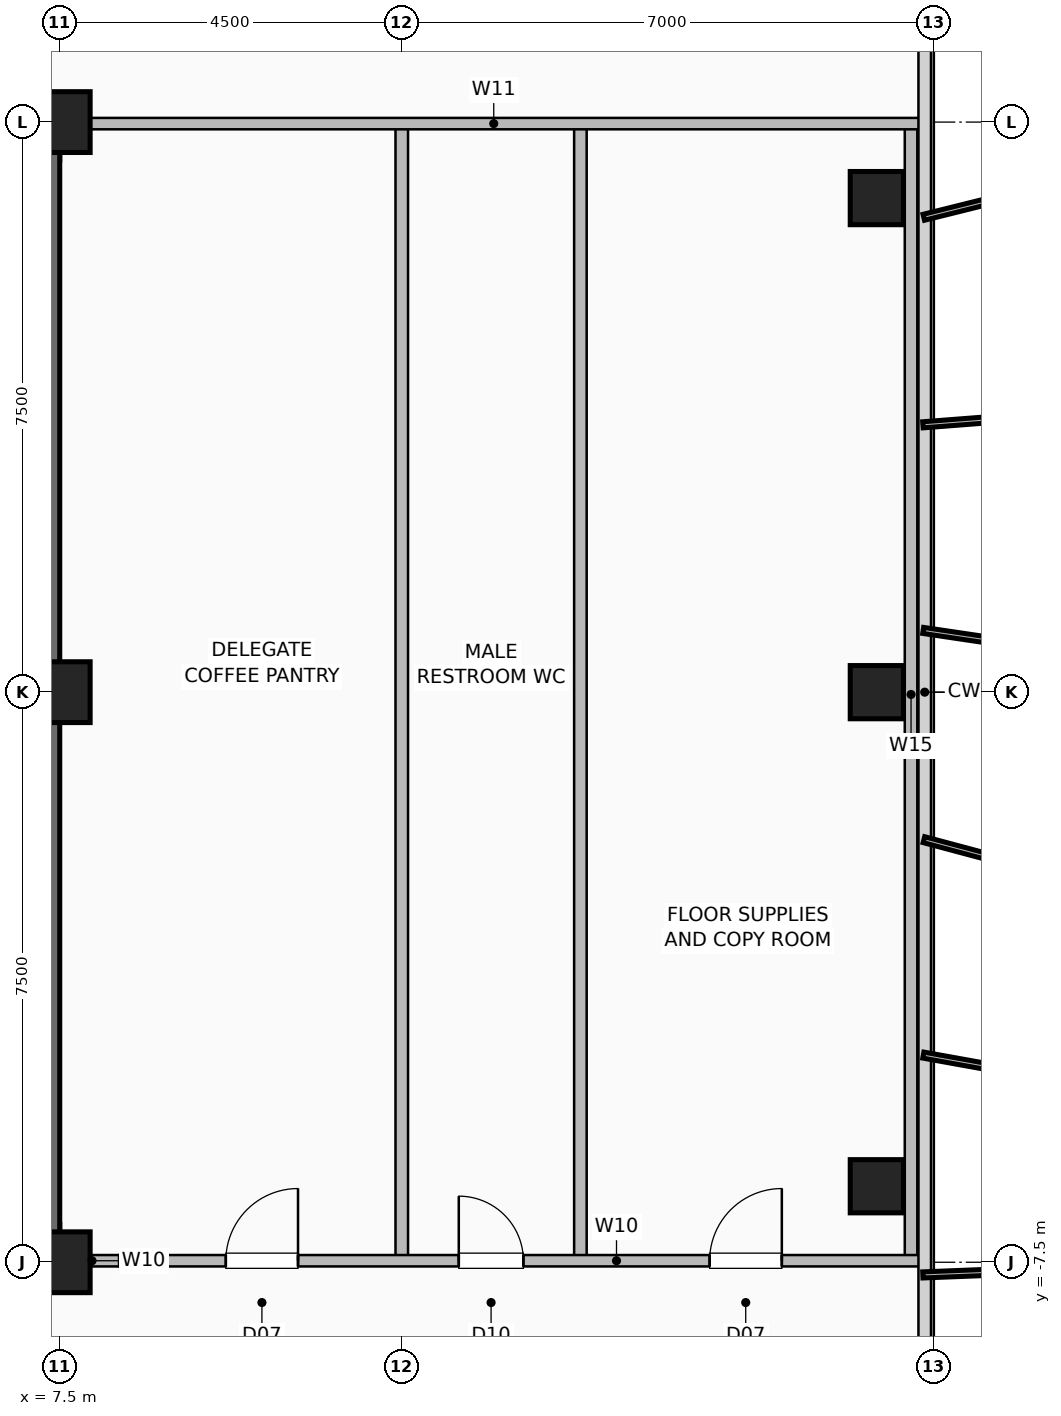
"""IFC4 building model, lengths in metres.
Left out: names, types, materials, properties, quantities, classifications, styles, units other than length and angle.
Written with IfcOpenShell. Run it as: python <this file> out.ifc"""

import sys

from ifc_helpers import new_model, si_unit, direction, frame, frame_2d, origin, origin_2d, place, context, subcontext, project, spatial, rectangle, hollow_rectangle, extrude, element, fill, save


model = new_model("IFC4")
c1 = context("Model", 3, precision=1e-05, world=origin(), true_north=direction((0.0, 1.0)))
c2 = subcontext(c1, "Body", "Model", "MODEL_VIEW")
j1 = project(units=[si_unit("LENGTHUNIT", "METRE"), si_unit("PLANEANGLEUNIT", "RADIAN")], contexts=[c1])
p1 = place(None, origin())
s1 = spatial("IfcSite", under=j1, at=p1, CompositionType="ELEMENT")
p2 = place(p1, origin())
s2 = spatial("IfcBuilding", under=s1, at=p2, CompositionType="ELEMENT")
p3 = place(p2, frame((0.0, 0.0, 250.4)))
s3 = spatial("IfcBuildingStorey", under=s2, at=p3, CompositionType="ELEMENT", Elevation=250.4)
for number, where, z_axis, x_axis in (
    (1, (7.5, -7.5, 0.0), (0.0, 0.0, 1.0), (1.0, 0.0, 0.0)),
    (2, (7.5, 0.0, 0.0), (0.0, 0.0, 1.0), (1.0, 0.0, 0.0)),
    (3, (7.5, 7.5, 0.0), (0.0, 0.0, 1.0), (1.0, 0.0, 0.0)),
):
    element("IfcColumn", number, at=place(p3, frame(where, z_axis=z_axis, x_axis=x_axis)), inside=s3, PredefinedType="COLUMN", context=c2, shape_type="SweptSolid", body=[
        extrude(hollow_rectangle(XDim=0.8, YDim=0.8, WallThickness=0.04, at=origin_2d()), origin(), (0.0, 0.0, 1.0), 3.6),
    ])
for number, where, z_axis, x_axis in (
    (4, (18.25, -6.5, 0.0), (0.0, 0.0, 1.0), (1.0, 0.0, 0.0)),
    (5, (18.25, 0.0, 0.0), (0.0, 0.0, 1.0), (1.0, 0.0, 0.0)),
    (6, (18.25, 6.5, 0.0), (0.0, 0.0, 1.0), (1.0, 0.0, 0.0)),
):
    element("IfcColumn", number, at=place(p3, frame(where, z_axis=z_axis, x_axis=x_axis)), inside=s3, PredefinedType="COLUMN", context=c2, shape_type="SweptSolid", body=[
        extrude(hollow_rectangle(XDim=0.7, YDim=0.7, WallThickness=0.035, at=origin_2d()), origin(), (0.0, 0.0, 1.0), 3.6),
    ])
p4 = place(p3, frame((-7.5, -7.25, 0.0), z_axis=(0.0, 0.0, 1.0), x_axis=(1.0, 0.0, 0.0)))
e7 = element("IfcWall", 7, at=p4, inside=s3, PredefinedType="SHEAR", context=c2, shape_type="SweptSolid", body=[
    extrude(rectangle(XDim=15.0, YDim=0.5, at=frame_2d((7.5, 0.0))), origin(), (0.0, 0.0, 1.0), 3.36),
])
p5 = place(p4, frame((1.55, 0.0, 0.0)))
e8 = element("IfcOpeningElement", 8, at=p5, cuts=e7, PredefinedType="OPENING", context=c2, shape_type="SweptSolid", body=[
    extrude(rectangle(XDim=1.05, YDim=2.08, at=frame_2d((0.525, 1.04))), frame((0.0, 0.26, 0.0), z_axis=(0.0, -1.0, 0.0), x_axis=(1.0, 0.0, 0.0)), (0.0, 0.0, 1.0), 0.52),
])
p6 = place(p4, frame((12.4, 0.0, 0.0)))
e9 = element("IfcOpeningElement", 9, at=p6, cuts=e7, PredefinedType="OPENING", context=c2, shape_type="SweptSolid", body=[
    extrude(rectangle(XDim=1.05, YDim=2.08, at=frame_2d((0.525, 1.04))), frame((0.0, 0.26, 0.0), z_axis=(0.0, -1.0, 0.0), x_axis=(1.0, 0.0, 0.0)), (0.0, 0.0, 1.0), 0.52),
])
p7 = place(p4, frame((4.95, 0.0, 0.0)))
e10 = element("IfcOpeningElement", 10, at=p7, cuts=e7, PredefinedType="OPENING", context=c2, shape_type="SweptSolid", body=[
    extrude(rectangle(XDim=1.0, YDim=2.08, at=frame_2d((0.5, 1.04))), frame((0.0, 0.26, 0.0), z_axis=(0.0, -1.0, 0.0), x_axis=(1.0, 0.0, 0.0)), (0.0, 0.0, 1.0), 0.52),
])
p8 = place(p4, frame((7.05, 0.0, 0.0)))
e11 = element("IfcOpeningElement", 11, at=p8, cuts=e7, PredefinedType="OPENING", context=c2, shape_type="SweptSolid", body=[
    extrude(rectangle(XDim=1.0, YDim=2.08, at=frame_2d((0.5, 1.04))), frame((0.0, 0.26, 0.0), z_axis=(0.0, -1.0, 0.0), x_axis=(1.0, 0.0, 0.0)), (0.0, 0.0, 1.0), 0.52),
])
p9 = place(p4, frame((9.15, 0.0, 0.0)))
e12 = element("IfcOpeningElement", 12, at=p9, cuts=e7, PredefinedType="OPENING", context=c2, shape_type="SweptSolid", body=[
    extrude(rectangle(XDim=1.0, YDim=2.08, at=frame_2d((0.5, 1.04))), frame((0.0, 0.26, 0.0), z_axis=(0.0, -1.0, 0.0), x_axis=(1.0, 0.0, 0.0)), (0.0, 0.0, 1.0), 0.52),
])
for number, where, z_axis, x_axis in (
    (13, (-7.5, 7.25, 0.0), (0.0, 0.0, 1.0), (1.0, 0.0, 0.0)),
    (14, (7.25, -7.5, 0.0), (0.0, 0.0, 1.0), (0.0, 1.0, 0.0)),
):
    element("IfcWall", number, at=place(p3, frame(where, z_axis=z_axis, x_axis=x_axis)), inside=s3, PredefinedType="SHEAR", context=c2, shape_type="SweptSolid", body=[
        extrude(rectangle(XDim=15.0, YDim=0.5, at=frame_2d((7.5, 0.0))), origin(), (0.0, 0.0, 1.0), 3.36),
    ])
p10 = place(p3, frame((7.45, -7.48, 0.0), z_axis=(0.0, 0.0, 1.0), x_axis=(1.0, 0.0, 0.0)))
e15 = element("IfcWall", 15, at=p10, inside=s3, PredefinedType="PARTITIONING", context=c2, shape_type="SweptSolid", body=[
    extrude(rectangle(XDim=0.95, YDim=0.15, at=frame_2d((0.475, 0.0))), origin(), (0.0, 0.0, 1.0), 3.36),
])
for number, where, z_axis, x_axis in (
    (16, (14.35, -7.48, 0.0), (0.0, 0.0, 1.0), (0.0, 1.0, 0.0)),
    (17, (12.0, -7.48, 0.0), (0.0, 0.0, 1.0), (0.0, 1.0, 0.0)),
    (18, (18.7, -7.48, 0.0), (0.0, 0.0, 1.0), (0.0, 1.0, 0.0)),
):
    element("IfcWall", number, at=place(p3, frame(where, z_axis=z_axis, x_axis=x_axis)), inside=s3, PredefinedType="PLUMBINGWALL", context=c2, shape_type="SweptSolid", body=[
        extrude(rectangle(XDim=14.9, YDim=0.165, at=frame_2d((7.45, 0.0))), origin(), (0.0, 0.0, 1.0), 3.36),
    ])
p11 = place(p3, frame((8.28, -7.48, 0.0), z_axis=(0.0, 0.0, 1.0), x_axis=(1.0, 0.0, 0.0)))
e19 = element("IfcWall", 19, at=p11, inside=s3, PredefinedType="PARTITIONING", context=c2, shape_type="SweptSolid", body=[
    extrude(rectangle(XDim=10.54, YDim=0.15, at=frame_2d((5.27, 0.0))), origin(), (0.0, 0.0, 1.0), 3.36),
])
p12 = place(p11, frame((1.405, 0.0, 0.0)))
e20 = element("IfcOpeningElement", 20, at=p12, cuts=e19, PredefinedType="OPENING", context=c2, shape_type="SweptSolid", body=[
    extrude(rectangle(XDim=0.95, YDim=2.06, at=frame_2d((0.475, 1.03))), frame((0.0, 0.085, 0.0), z_axis=(0.0, -1.0, 0.0), x_axis=(1.0, 0.0, 0.0)), (0.0, 0.0, 1.0), 0.17),
])
p13 = place(p11, frame((4.47, 0.0, 0.0)))
e21 = element("IfcOpeningElement", 21, at=p13, cuts=e19, PredefinedType="OPENING", context=c2, shape_type="SweptSolid", body=[
    extrude(rectangle(XDim=0.85, YDim=2.05, at=frame_2d((0.425, 1.025))), frame((0.0, 0.085, 0.0), z_axis=(0.0, -1.0, 0.0), x_axis=(1.0, 0.0, 0.0)), (0.0, 0.0, 1.0), 0.17),
])
p14 = place(p11, frame((7.77, 0.0, 0.0)))
e22 = element("IfcOpeningElement", 22, at=p14, cuts=e19, PredefinedType="OPENING", context=c2, shape_type="SweptSolid", body=[
    extrude(rectangle(XDim=0.95, YDim=2.06, at=frame_2d((0.475, 1.03))), frame((0.0, 0.085, 0.0), z_axis=(0.0, -1.0, 0.0), x_axis=(1.0, 0.0, 0.0)), (0.0, 0.0, 1.0), 0.17),
])
p15 = place(p3, frame((7.6, 7.48, 0.0), z_axis=(0.0, 0.0, 1.0), x_axis=(1.0, 0.0, 0.0)))
e23 = element("IfcWall", 23, at=p15, inside=s3, PredefinedType="PARTITIONING", context=c2, shape_type="SweptSolid", body=[
    extrude(rectangle(XDim=11.22, YDim=0.15, at=frame_2d((5.61, 0.0))), origin(), (0.0, 0.0, 1.0), 3.36),
])
p16 = place(p12, origin())
e24 = element("IfcDoor", 24, at=p16, inside=s3, OperationType="SINGLE_SWING_RIGHT", PredefinedType="DOOR", context=c2, shape_type="SweptSolid", body=[
    extrude(rectangle(XDim=0.95, YDim=2.06, at=frame_2d((0.475, 1.03))), frame((0.0, 0.025, 0.0), z_axis=(0.0, -1.0, 0.0), x_axis=(1.0, 0.0, 0.0)), (0.0, 0.0, 1.0), 0.05),
])
fill(e20, e24)
p17 = place(p13, origin())
e25 = element("IfcDoor", 25, at=p17, inside=s3, OperationType="SINGLE_SWING_LEFT", PredefinedType="DOOR", context=c2, shape_type="SweptSolid", body=[
    extrude(rectangle(XDim=0.85, YDim=2.05, at=frame_2d((0.425, 1.025))), frame((0.0, 0.025, 0.0), z_axis=(0.0, -1.0, 0.0), x_axis=(1.0, 0.0, 0.0)), (0.0, 0.0, 1.0), 0.05),
])
fill(e21, e25)
p18 = place(p14, origin())
e26 = element("IfcDoor", 26, at=p18, inside=s3, OperationType="SINGLE_SWING_RIGHT", PredefinedType="DOOR", context=c2, shape_type="SweptSolid", body=[
    extrude(rectangle(XDim=0.95, YDim=2.06, at=frame_2d((0.475, 1.03))), frame((0.0, 0.025, 0.0), z_axis=(0.0, -1.0, 0.0), x_axis=(1.0, 0.0, 0.0)), (0.0, 0.0, 1.0), 0.05),
])
fill(e22, e26)
save(model, sys.argv[1])
